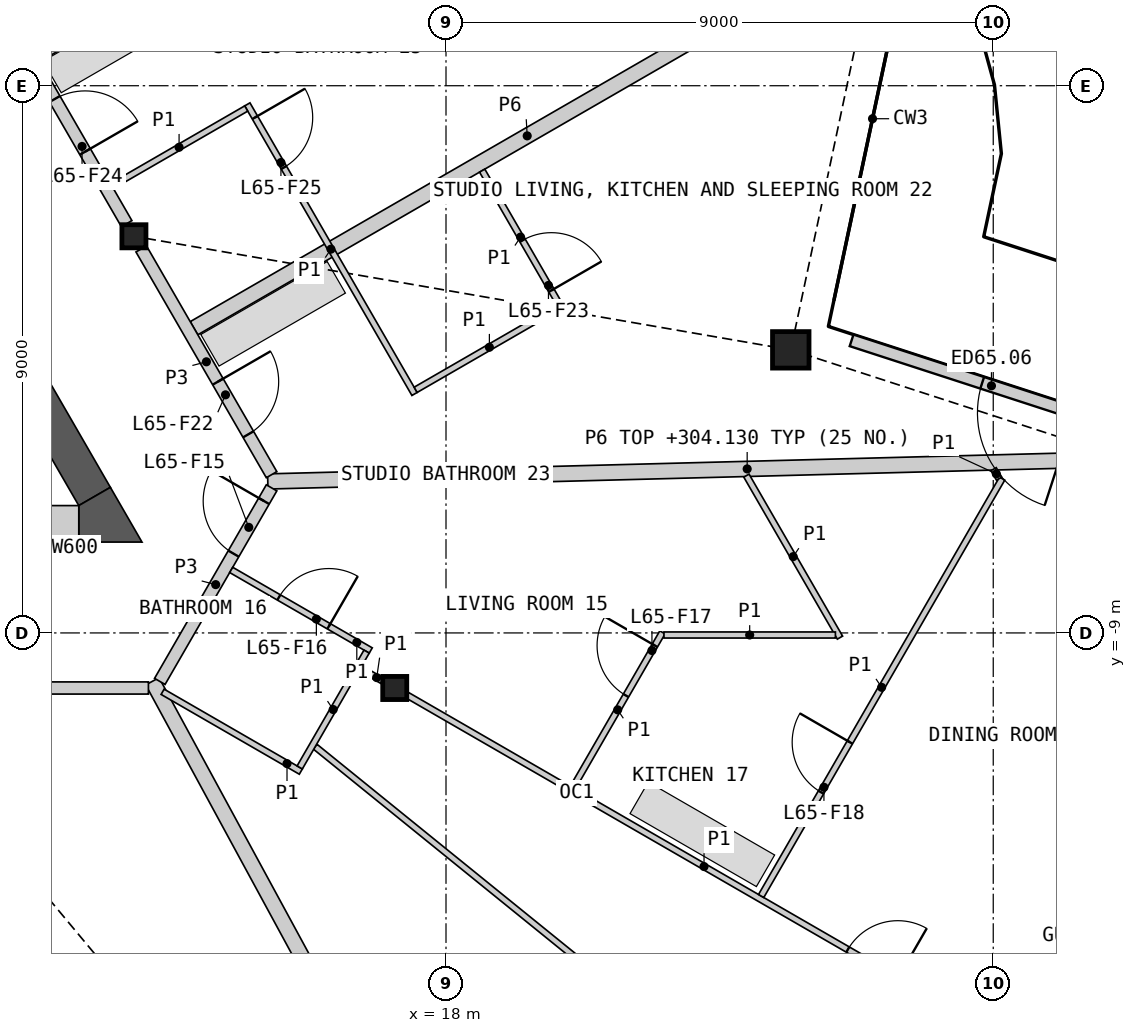
"""IFC4 building model, lengths in metres.
Left out: names, types, materials, properties, quantities, classifications, styles, units other than length and angle.
Written with IfcOpenShell. Run it as: python <this file> out.ifc"""

import sys

from ifc_helpers import new_model, si_unit, direction, frame, frame_2d, origin, origin_2d, place, context, subcontext, project, spatial, polyline, rectangle, hollow_rectangle, i_section, outline, extrude, element, fill, save


model = new_model("IFC4")
c1 = context("Model", 3, precision=1e-05, world=origin(), true_north=direction((0.0, 1.0)))
c2 = subcontext(c1, "Body", "Model", "MODEL_VIEW")
j1 = project(units=[si_unit("LENGTHUNIT", "METRE"), si_unit("PLANEANGLEUNIT", "RADIAN")], contexts=[c1])
p1 = place(None, origin())
s1 = spatial("IfcSite", under=j1, at=p1, CompositionType="ELEMENT")
p2 = place(p1, origin())
s2 = spatial("IfcBuilding", under=s1, at=p2, CompositionType="ELEMENT")
p3 = place(p2, frame((0.0, 0.0, 301.8)))
s3 = spatial("IfcBuildingStorey", under=s2, at=p3, CompositionType="ELEMENT", Elevation=301.8)
p4 = place(p3, frame((23.67, -4.344, 0.0), z_axis=(0.0, 0.0, 1.0), x_axis=(1.0, 0.0, 0.0)))
e1 = element("IfcColumn", 1, at=p4, inside=s3, PredefinedType="COLUMN", context=c2, shape_type="SweptSolid", body=[
    extrude(hollow_rectangle(XDim=0.6, YDim=0.6, WallThickness=0.04, at=origin_2d()), origin(), (0.0, 0.0, 1.0), 3.4),
])
for number, where, z_axis, x_axis in (
    (2, (17.157, -9.906, 0.0), (0.0, 0.0, 1.0), (1.0, 0.0, 0.0)),
    (3, (12.868, -2.476, 0.0), (0.0, 0.0, 1.0), (1.0, 0.0, 0.0)),
):
    element("IfcColumn", number, at=place(p3, frame(where, z_axis=z_axis, x_axis=x_axis)), inside=s3, PredefinedType="COLUMN", context=c2, shape_type="SweptSolid", body=[
        extrude(i_section(OverallWidth=0.396, OverallDepth=0.381, WebThickness=0.019, FlangeThickness=0.03, at=origin_2d()), origin(), (0.0, 0.0, 1.0), 3.4),
    ])
p5 = place(p3, frame((27.812, -15.588, 0.0), z_axis=(0.0, 0.0, 1.0), x_axis=(0.500032109083, 0.866006864803, 0.0)))
e4 = element("IfcWall", 4, at=p5, inside=s3, PredefinedType="SOLIDWALL", context=c2, shape_type="SweptSolid", body=[
    extrude(rectangle(XDim=2.684, YDim=0.25, at=frame_2d((1.342, 0.0))), origin(), (0.0, 0.0, 1.0), 2.488),
])
p6 = place(p3, frame((30.488, -6.078, 0.0), z_axis=(0.0, 0.0, 1.0), x_axis=(-0.951062515241, 0.308998530908, 0.0)))
e5 = element("IfcWall", 5, at=p6, inside=s3, PredefinedType="SOLIDWALL", context=c2, shape_type="SweptSolid", body=[
    extrude(rectangle(XDim=6.117, YDim=0.2, at=frame_2d((3.059, 0.0))), origin(), (0.0, 0.0, 1.0), 2.488),
])
p7 = place(p6, frame((2.259, 0.0, 0.0)))
e6 = element("IfcOpeningElement", 6, at=p7, cuts=e5, PredefinedType="OPENING", context=c2, shape_type="SweptSolid", body=[
    extrude(rectangle(XDim=1.6, YDim=2.25, at=frame_2d((0.8, 1.125))), frame((0.0, 0.11, 0.0), z_axis=(0.0, -1.0, 0.0), x_axis=(1.0, 0.0, 0.0)), (0.0, 0.0, 1.0), 0.22),
])
p8 = place(p3, frame((12.221, -6.756, 0.0), z_axis=(0.0, 0.0, 1.0), x_axis=(-0.500020646047, 0.866013483456, 0.0)))
e7 = element("IfcWall", 7, at=p8, inside=s3, PredefinedType="SHEAR", context=c2, shape_type="SweptSolid", body=[
    extrude(rectangle(XDim=4.559, YDim=0.6, at=frame_2d((2.28, 0.0))), origin(), (0.0, 0.0, 1.0), 3.1),
])
p9 = place(p3, origin())
e8 = element("IfcWall", 8, at=p9, inside=s3, PredefinedType="SHEAR", context=c2, shape_type="SweptSolid", body=[
    extrude(outline(polyline([(11.961, -7.506), (11.961, -6.906), (12.48, -6.606), (13.0, -7.506), (11.961, -7.506)])), origin(), (0.0, 0.0, 1.0), 3.1),
])
p10 = place(p3, frame((9.369, -7.206, 0.0), z_axis=(0.0, 0.0, 1.0), x_axis=(1.0, 0.0, 0.0)))
e9 = element("IfcWall", 9, at=p10, inside=s3, PredefinedType="SHEAR", context=c2, shape_type="SweptSolid", body=[
    extrude(rectangle(XDim=2.592, YDim=0.6, at=frame_2d((1.296, 0.0))), origin(), (0.0, 0.0, 1.0), 3.1),
])
p11 = place(p10, frame((0.6, 0.0, 0.0)))
e10 = element("IfcOpeningElement", 10, at=p11, cuts=e9, PredefinedType="OPENING", context=c2, shape_type="SweptSolid", body=[
    extrude(rectangle(XDim=1.0, YDim=2.1, at=frame_2d((0.5, 1.05))), frame((0.0, 0.31, 0.0), z_axis=(0.0, -1.0, 0.0), x_axis=(1.0, 0.0, 0.0)), (0.0, 0.0, 1.0), 0.62),
])
p12 = place(p3, frame((15.069, -6.509, 0.0), z_axis=(0.0, 0.0, 1.0), x_axis=(0.999657828615, 0.026157708023, 0.0)))
e11 = element("IfcWall", 11, at=p12, inside=s3, PredefinedType="PARTITIONING", context=c2, shape_type="SweptSolid", body=[
    extrude(rectangle(XDim=15.773, YDim=0.25, at=frame_2d((7.887, 0.0))), origin(), (0.0, 0.0, 1.0), 2.33),
])
p13 = place(p3, frame((13.171, -9.796, 0.0), z_axis=(0.0, 0.0, 1.0), x_axis=(0.477178668135, -0.878806303275, 0.0)))
e12 = element("IfcWall", 12, at=p13, inside=s3, PredefinedType="PARTITIONING", context=c2, shape_type="SweptSolid", body=[
    extrude(rectangle(XDim=15.33, YDim=0.25, at=frame_2d((7.665, 0.0))), origin(), (0.0, 0.0, 1.0), 2.33),
])
p14 = place(p3, frame((13.856, -3.988, 0.0), z_axis=(0.0, 0.0, 1.0), x_axis=(0.866021406514, 0.500006923412, 0.0)))
e13 = element("IfcWall", 13, at=p14, inside=s3, PredefinedType="PARTITIONING", context=c2, shape_type="SweptSolid", body=[
    extrude(rectangle(XDim=12.654, YDim=0.25, at=frame_2d((6.327, 0.0))), origin(), (0.0, 0.0, 1.0), 2.33),
])
p15 = place(p3, frame((8.698, 4.745, 0.0), z_axis=(0.0, 0.0, 1.0), x_axis=(0.499984266882, -0.866034487114, 0.0)))
e14 = element("IfcWall", 14, at=p15, inside=s3, PredefinedType="PARTITIONING", context=c2, shape_type="SweptSolid", body=[
    extrude(rectangle(XDim=8.099, YDim=0.2, at=frame_2d((4.049, 0.0))), origin(), (0.0, 0.0, 1.0), 3.1),
])
p16 = place(p15, frame((5.732, 0.0, 0.0)))
e15 = element("IfcOpeningElement", 15, at=p16, cuts=e14, PredefinedType="OPENING", context=c2, shape_type="SweptSolid", body=[
    extrude(rectangle(XDim=1.0, YDim=2.1, at=frame_2d((0.5, 1.05))), frame((0.0, 0.11, 0.0), z_axis=(0.0, -1.0, 0.0), x_axis=(1.0, 0.0, 0.0)), (0.0, 0.0, 1.0), 0.22),
])
p17 = place(p3, frame((11.26, 0.507, 0.0), z_axis=(0.0, 0.0, 1.0), x_axis=(0.86602842894, 0.499994760241, 0.0)))
e16 = element("IfcWall", 16, at=p17, inside=s3, PredefinedType="PARTITIONING", context=c2, shape_type="SweptSolid", body=[
    extrude(rectangle(XDim=7.968, YDim=0.25, at=frame_2d((3.984, 0.0))), origin(), (0.0, 0.0, 1.0), 2.33),
])
p18 = place(p3, frame((8.786, -9.906, 0.0), z_axis=(0.0, 0.0, 1.0), x_axis=(1.0, 0.0, 0.0)))
e17 = element("IfcWall", 17, at=p18, inside=s3, PredefinedType="PARTITIONING", context=c2, shape_type="SweptSolid", body=[
    extrude(rectangle(XDim=4.32, YDim=0.2, at=frame_2d((2.16, 0.0))), origin(), (0.0, 0.0, 1.0), 3.1),
])
p19 = place(p3, frame((12.988, -2.684, 0.0), z_axis=(0.0, 0.0, 1.0), x_axis=(0.500003406062, -0.866023437285, 0.0)))
e18 = element("IfcWall", 18, at=p19, inside=s3, PredefinedType="PARTITIONING", context=c2, shape_type="SweptSolid", body=[
    extrude(rectangle(XDim=4.288, YDim=0.2, at=frame_2d((2.144, 0.0))), origin(), (0.0, 0.0, 1.0), 3.1),
])
p20 = place(p19, frame((2.521, 0.0, 0.0)))
e19 = element("IfcOpeningElement", 19, at=p20, cuts=e18, PredefinedType="OPENING", context=c2, shape_type="SweptSolid", body=[
    extrude(rectangle(XDim=1.0, YDim=2.1, at=frame_2d((0.5, 1.05))), frame((0.0, 0.11, 0.0), z_axis=(0.0, -1.0, 0.0), x_axis=(1.0, 0.0, 0.0)), (0.0, 0.0, 1.0), 0.22),
])
p21 = place(p3, frame((13.293, -9.797, 0.0), z_axis=(0.0, 0.0, 1.0), x_axis=(0.499967746641, 0.866044024469, 0.0)))
e20 = element("IfcWall", 20, at=p21, inside=s3, PredefinedType="PARTITIONING", context=c2, shape_type="SweptSolid", body=[
    extrude(rectangle(XDim=3.676, YDim=0.2, at=frame_2d((1.838, 0.0))), origin(), (0.0, 0.0, 1.0), 3.1),
])
p22 = place(p21, frame((2.426, 0.0, 0.0)))
e21 = element("IfcOpeningElement", 21, at=p22, cuts=e20, PredefinedType="OPENING", context=c2, shape_type="SweptSolid", body=[
    extrude(rectangle(XDim=1.0, YDim=2.1, at=frame_2d((0.5, 1.05))), frame((0.0, 0.11, 0.0), z_axis=(0.0, -1.0, 0.0), x_axis=(1.0, 0.0, 0.0)), (0.0, 0.0, 1.0), 0.22),
])
p23 = place(p3, frame((15.848, -10.871, 0.0), z_axis=(0.0, 0.0, 1.0), x_axis=(0.77713687197, -0.629331615465, 0.0)))
e22 = element("IfcWall", 22, at=p23, inside=s3, PredefinedType="PARTITIONING", context=c2, shape_type="SweptSolid", body=[
    extrude(rectangle(XDim=13.004, YDim=0.1, at=frame_2d((6.502, 0.0))), origin(), (0.0, 0.0, 1.0), 2.33),
])
p24 = place(p23, frame((7.384, 0.0, 0.0)))
e23 = element("IfcOpeningElement", 23, at=p24, cuts=e22, PredefinedType="OPENING", context=c2, shape_type="SweptSolid", body=[
    extrude(rectangle(XDim=0.95, YDim=2.1, at=frame_2d((0.475, 1.05))), frame((0.0, 0.06, 0.0), z_axis=(0.0, -1.0, 0.0), x_axis=(1.0, 0.0, 0.0)), (0.0, 0.0, 1.0), 0.12),
])
p25 = place(p3, frame((17.365, -10.025, 0.0), z_axis=(0.0, 0.0, 1.0), x_axis=(0.866021046153, -0.500007547564, 0.0)))
e24 = element("IfcWall", 24, at=p25, inside=s3, PredefinedType="PARTITIONING", context=c2, shape_type="SweptSolid", body=[
    extrude(rectangle(XDim=11.267, YDim=0.1, at=frame_2d((5.634, 0.0))), origin(), (0.0, 0.0, 1.0), 2.33),
])
p26 = place(p25, frame((8.364, 0.0, 0.0)))
e25 = element("IfcOpeningElement", 25, at=p26, cuts=e24, PredefinedType="OPENING", context=c2, shape_type="SweptSolid", body=[
    extrude(rectangle(XDim=0.95, YDim=2.1, at=frame_2d((0.475, 1.05))), frame((0.0, 0.06, 0.0), z_axis=(0.0, -1.0, 0.0), x_axis=(1.0, 0.0, 0.0)), (0.0, 0.0, 1.0), 0.12),
])
p27 = place(p3, frame((23.183, -13.327, 0.0), z_axis=(0.0, 0.0, 1.0), x_axis=(0.499991741039, 0.866030172045, 0.0)))
e26 = element("IfcWall", 26, at=p27, inside=s3, PredefinedType="PARTITIONING", context=c2, shape_type="SweptSolid", body=[
    extrude(rectangle(XDim=7.927, YDim=0.1, at=frame_2d((3.963, 0.0))), origin(), (0.0, 0.0, 1.0), 2.33),
])
p28 = place(p27, frame((1.97, 0.0, 0.0)))
e27 = element("IfcOpeningElement", 27, at=p28, cuts=e26, PredefinedType="OPENING", context=c2, shape_type="SweptSolid", body=[
    extrude(rectangle(XDim=0.95, YDim=2.1, at=frame_2d((0.475, 1.05))), frame((0.0, 0.06, 0.0), z_axis=(0.0, -1.0, 0.0), x_axis=(1.0, 0.0, 0.0)), (0.0, 0.0, 1.0), 0.12),
])
p29 = place(p3, frame((14.733, -0.307, 0.0), z_axis=(0.0, 0.0, 1.0), x_axis=(0.499996545922, -0.866027397988, 0.0)))
e28 = element("IfcWall", 28, at=p29, inside=s3, PredefinedType="PARTITIONING", context=c2, shape_type="SweptSolid", body=[
    extrude(rectangle(XDim=5.5, YDim=0.1, at=frame_2d((2.75, 0.0))), origin(), (0.0, 0.0, 1.0), 2.33),
])
p30 = place(p29, frame((0.25, 0.0, 0.0)))
e29 = element("IfcOpeningElement", 29, at=p30, cuts=e28, PredefinedType="OPENING", context=c2, shape_type="SweptSolid", body=[
    extrude(rectangle(XDim=0.95, YDim=2.1, at=frame_2d((0.475, 1.05))), frame((0.0, 0.06, 0.0), z_axis=(0.0, -1.0, 0.0), x_axis=(1.0, 0.0, 0.0)), (0.0, 0.0, 1.0), 0.12),
])
p31 = place(p3, frame((22.941, -6.413, 0.0), z_axis=(0.0, 0.0, 1.0), x_axis=(0.500013199183, -0.866017783098, 0.0)))
e30 = element("IfcWall", 30, at=p31, inside=s3, PredefinedType="PARTITIONING", context=c2, shape_type="SweptSolid", body=[
    extrude(rectangle(XDim=3.077, YDim=0.1, at=frame_2d((1.539, 0.0))), origin(), (0.0, 0.0, 1.0), 2.33),
])
p32 = place(p3, frame((20.088, -11.54, 0.0), z_axis=(0.0, 0.0, 1.0), x_axis=(0.500055103712, 0.865993587304, 0.0)))
e31 = element("IfcWall", 31, at=p32, inside=s3, PredefinedType="PARTITIONING", context=c2, shape_type="SweptSolid", body=[
    extrude(rectangle(XDim=2.944, YDim=0.1, at=frame_2d((1.472, 0.0))), origin(), (0.0, 0.0, 1.0), 2.33),
])
p33 = place(p32, frame((1.744, 0.0, 0.0)))
e32 = element("IfcOpeningElement", 32, at=p33, cuts=e31, PredefinedType="OPENING", context=c2, shape_type="SweptSolid", body=[
    extrude(rectangle(XDim=0.95, YDim=2.1, at=frame_2d((0.475, 1.05))), frame((0.0, 0.06, 0.0), z_axis=(0.0, -1.0, 0.0), x_axis=(1.0, 0.0, 0.0)), (0.0, 0.0, 1.0), 0.12),
])
p34 = place(p3, frame((21.584, -9.034, 0.0), z_axis=(0.0, 0.0, 1.0), x_axis=(1.0, 0.0, 0.0)))
e33 = element("IfcWall", 33, at=p34, inside=s3, PredefinedType="PARTITIONING", context=c2, shape_type="SweptSolid", body=[
    extrude(rectangle(XDim=2.82, YDim=0.1, at=frame_2d((1.41, 0.0))), origin(), (0.0, 0.0, 1.0), 2.33),
])
p35 = place(p3, frame((17.501, -5.001, 0.0), z_axis=(0.0, 0.0, 1.0), x_axis=(0.866034573852, 0.49998411664, 0.0)))
e34 = element("IfcWall", 34, at=p35, inside=s3, PredefinedType="PARTITIONING", context=c2, shape_type="SweptSolid", body=[
    extrude(rectangle(XDim=2.8, YDim=0.1, at=frame_2d((1.4, 0.0))), origin(), (0.0, 0.0, 1.0), 2.33),
])
p36 = place(p3, frame((18.595, -1.396, 0.0), z_axis=(0.0, 0.0, 1.0), x_axis=(0.499976333282, -0.866039067339, 0.0)))
e35 = element("IfcWall", 35, at=p36, inside=s3, PredefinedType="PARTITIONING", context=c2, shape_type="SweptSolid", body=[
    extrude(rectangle(XDim=2.525, YDim=0.1, at=frame_2d((1.262, 0.0))), origin(), (0.0, 0.0, 1.0), 2.33),
])
p37 = place(p36, frame((1.325, 0.0, 0.0)))
e36 = element("IfcOpeningElement", 36, at=p37, cuts=e35, PredefinedType="OPENING", context=c2, shape_type="SweptSolid", body=[
    extrude(rectangle(XDim=0.95, YDim=2.1, at=frame_2d((0.475, 1.05))), frame((0.0, 0.06, 0.0), z_axis=(0.0, -1.0, 0.0), x_axis=(1.0, 0.0, 0.0)), (0.0, 0.0, 1.0), 0.12),
])
p38 = place(p3, frame((12.506, -1.65, 0.0), z_axis=(0.0, 0.0, 1.0), x_axis=(0.866030925526, 0.499990435942, 0.0)))
e37 = element("IfcWall", 37, at=p38, inside=s3, PredefinedType="PARTITIONING", context=c2, shape_type="SweptSolid", body=[
    extrude(rectangle(XDim=2.55, YDim=0.1, at=frame_2d((1.275, 0.0))), origin(), (0.0, 0.0, 1.0), 2.33),
])
p39 = place(p3, frame((14.468, -7.964, 0.0), z_axis=(0.0, 0.0, 1.0), x_axis=(0.865989200783, -0.500062700197, 0.0)))
e38 = element("IfcWall", 38, at=p39, inside=s3, PredefinedType="PARTITIONING", context=c2, shape_type="SweptSolid", body=[
    extrude(rectangle(XDim=2.65, YDim=0.1, at=frame_2d((1.325, 0.0))), origin(), (0.0, 0.0, 1.0), 2.33),
])
p40 = place(p39, frame((0.905, 0.0, 0.0)))
e39 = element("IfcOpeningElement", 39, at=p40, cuts=e38, PredefinedType="OPENING", context=c2, shape_type="SweptSolid", body=[
    extrude(rectangle(XDim=0.95, YDim=2.1, at=frame_2d((0.475, 1.05))), frame((0.0, 0.06, 0.0), z_axis=(0.0, -1.0, 0.0), x_axis=(1.0, 0.0, 0.0)), (0.0, 0.0, 1.0), 0.12),
])
p41 = place(p3, frame((13.339, -9.968, 0.0), z_axis=(0.0, 0.0, 1.0), x_axis=(0.866036909293, -0.499980071345, 0.0)))
e40 = element("IfcWall", 40, at=p41, inside=s3, PredefinedType="PARTITIONING", context=c2, shape_type="SweptSolid", body=[
    extrude(rectangle(XDim=2.625, YDim=0.1, at=frame_2d((1.312, 0.0))), origin(), (0.0, 0.0, 1.0), 2.33),
])
p42 = place(p3, frame((15.594, -11.212, 0.0), z_axis=(0.0, 0.0, 1.0), x_axis=(0.499898558967, 0.866083962871, 0.0)))
e41 = element("IfcWall", 41, at=p42, inside=s3, PredefinedType="PARTITIONING", context=c2, shape_type="SweptSolid", body=[
    extrude(rectangle(XDim=2.2, YDim=0.1, at=frame_2d((1.1, 0.0))), origin(), (0.0, 0.0, 1.0), 2.33),
])
p43 = place(p3, frame((16.594, -9.581, 0.0), z_axis=(0.0, 0.0, 1.0), x_axis=(0.866036909293, -0.499980071345, 0.0)))
e42 = element("IfcWall", 42, at=p43, inside=s3, PredefinedType="PARTITIONING", context=c2, shape_type="SweptSolid", body=[
    extrude(rectangle(XDim=0.41, YDim=0.1, at=frame_2d((0.205, 0.0))), origin(), (0.0, 0.0, 1.0), 2.33),
])
p44 = place(p3, frame((27.006, -6.306, 0.0), z_axis=(0.0, 0.0, 1.0), x_axis=(0.500074377092, -0.865982457891, 0.0)))
e43 = element("IfcWall", 43, at=p44, inside=s3, PredefinedType="PARTITIONING", context=c2, shape_type="SweptSolid", body=[
    extrude(rectangle(XDim=0.18, YDim=0.1, at=frame_2d((0.09, 0.0))), origin(), (0.0, 0.0, 1.0), 2.33),
])
p45 = place(p7, origin())
e44 = element("IfcDoor", 44, at=p45, inside=s3, OperationType="DOUBLE_DOOR_SINGLE_SWING", PredefinedType="DOOR", context=c2, shape_type="SweptSolid", body=[
    extrude(rectangle(XDim=1.6, YDim=2.25, at=frame_2d((0.8, 1.125))), frame((0.0, 0.025, 0.0), z_axis=(0.0, -1.0, 0.0), x_axis=(1.0, 0.0, 0.0)), (0.0, 0.0, 1.0), 0.05),
])
fill(e6, e44)
p46 = place(p22, origin())
e45 = element("IfcDoor", 45, at=p46, inside=s3, OperationType="SINGLE_SWING_RIGHT", PredefinedType="DOOR", context=c2, shape_type="SweptSolid", body=[
    extrude(rectangle(XDim=1.0, YDim=2.1, at=frame_2d((0.5, 1.05))), frame((0.0, 0.025, 0.0), z_axis=(0.0, -1.0, 0.0), x_axis=(1.0, 0.0, 0.0)), (0.0, 0.0, 1.0), 0.05),
])
fill(e21, e45)
p47 = place(p40, origin())
e46 = element("IfcDoor", 46, at=p47, inside=s3, OperationType="SINGLE_SWING_RIGHT", PredefinedType="DOOR", context=c2, shape_type="SweptSolid", body=[
    extrude(rectangle(XDim=0.95, YDim=2.1, at=frame_2d((0.475, 1.05))), frame((0.0, 0.025, 0.0), z_axis=(0.0, -1.0, 0.0), x_axis=(1.0, 0.0, 0.0)), (0.0, 0.0, 1.0), 0.05),
])
fill(e39, e46)
p48 = place(p33, origin())
e47 = element("IfcDoor", 47, at=p48, inside=s3, OperationType="SINGLE_SWING_RIGHT", PredefinedType="DOOR", context=c2, shape_type="SweptSolid", body=[
    extrude(rectangle(XDim=0.95, YDim=2.1, at=frame_2d((0.475, 1.05))), frame((0.0, 0.025, 0.0), z_axis=(0.0, -1.0, 0.0), x_axis=(1.0, 0.0, 0.0)), (0.0, 0.0, 1.0), 0.05),
])
fill(e32, e47)
p49 = place(p28, origin())
e48 = element("IfcDoor", 48, at=p49, inside=s3, OperationType="SINGLE_SWING_RIGHT", PredefinedType="DOOR", context=c2, shape_type="SweptSolid", body=[
    extrude(rectangle(XDim=0.95, YDim=2.1, at=frame_2d((0.475, 1.05))), frame((0.0, 0.025, 0.0), z_axis=(0.0, -1.0, 0.0), x_axis=(1.0, 0.0, 0.0)), (0.0, 0.0, 1.0), 0.05),
])
fill(e27, e48)
p50 = place(p26, origin())
e49 = element("IfcDoor", 49, at=p50, inside=s3, OperationType="SINGLE_SWING_RIGHT", PredefinedType="DOOR", context=c2, shape_type="SweptSolid", body=[
    extrude(rectangle(XDim=0.95, YDim=2.1, at=frame_2d((0.475, 1.05))), frame((0.0, 0.025, 0.0), z_axis=(0.0, -1.0, 0.0), x_axis=(1.0, 0.0, 0.0)), (0.0, 0.0, 1.0), 0.05),
])
fill(e25, e49)
p51 = place(p20, origin())
e50 = element("IfcDoor", 50, at=p51, inside=s3, OperationType="SINGLE_SWING_LEFT", PredefinedType="DOOR", context=c2, shape_type="SweptSolid", body=[
    extrude(rectangle(XDim=1.0, YDim=2.1, at=frame_2d((0.5, 1.05))), frame((0.0, 0.025, 0.0), z_axis=(0.0, -1.0, 0.0), x_axis=(1.0, 0.0, 0.0)), (0.0, 0.0, 1.0), 0.05),
])
fill(e19, e50)
p52 = place(p37, origin())
e51 = element("IfcDoor", 51, at=p52, inside=s3, OperationType="SINGLE_SWING_RIGHT", PredefinedType="DOOR", context=c2, shape_type="SweptSolid", body=[
    extrude(rectangle(XDim=0.95, YDim=2.1, at=frame_2d((0.475, 1.05))), frame((0.0, 0.025, 0.0), z_axis=(0.0, -1.0, 0.0), x_axis=(1.0, 0.0, 0.0)), (0.0, 0.0, 1.0), 0.05),
])
fill(e36, e51)
p53 = place(p16, origin())
e52 = element("IfcDoor", 52, at=p53, inside=s3, OperationType="SINGLE_SWING_RIGHT", PredefinedType="DOOR", context=c2, shape_type="SweptSolid", body=[
    extrude(rectangle(XDim=1.0, YDim=2.1, at=frame_2d((0.5, 1.05))), frame((0.0, 0.025, 0.0), z_axis=(0.0, -1.0, 0.0), x_axis=(1.0, 0.0, 0.0)), (0.0, 0.0, 1.0), 0.05),
])
fill(e15, e52)
p54 = place(p30, origin())
e53 = element("IfcDoor", 53, at=p54, inside=s3, OperationType="SINGLE_SWING_LEFT", PredefinedType="DOOR", context=c2, shape_type="SweptSolid", body=[
    extrude(rectangle(XDim=0.95, YDim=2.1, at=frame_2d((0.475, 1.05))), frame((0.0, 0.025, 0.0), z_axis=(0.0, -1.0, 0.0), x_axis=(1.0, 0.0, 0.0)), (0.0, 0.0, 1.0), 0.05),
])
fill(e29, e53)
save(model, sys.argv[1])
